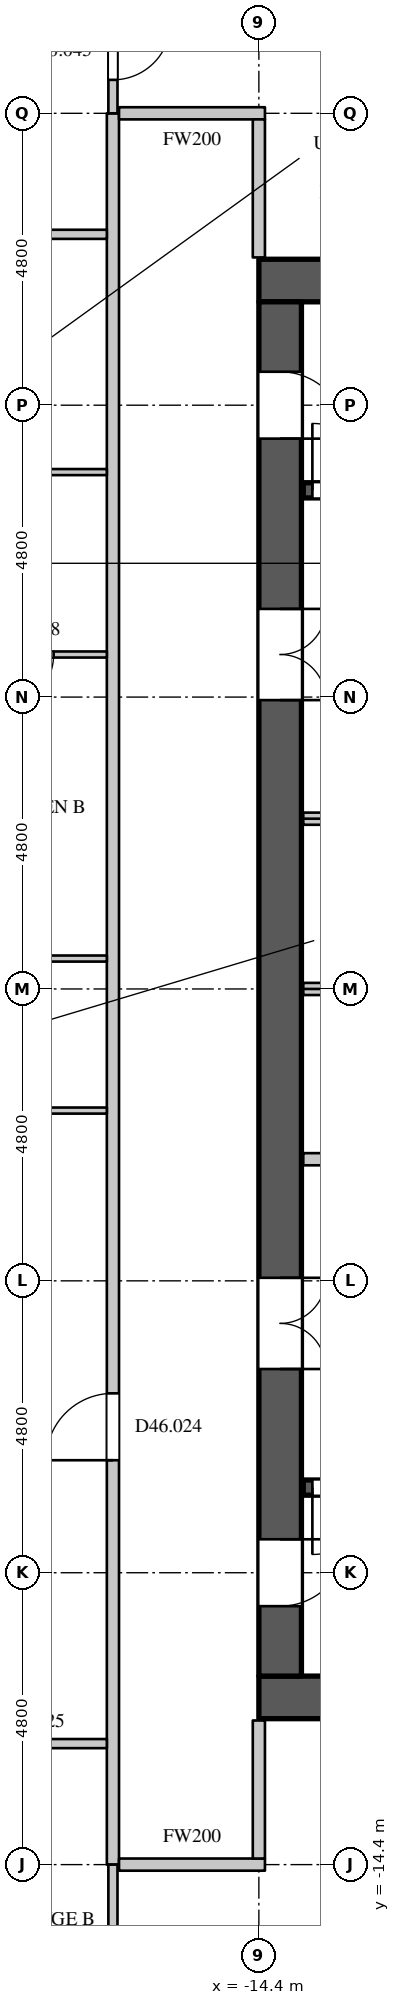
"""IFC4 building model, lengths in metres.
Left out: names, types, materials, properties, quantities, classifications, styles, units other than length and angle.
Written with IfcOpenShell. Run it as: python <this file> out.ifc"""

import sys

from ifc_helpers import new_model, si_unit, direction, frame, frame_2d, origin, place, context, subcontext, project, spatial, rectangle, extrude, element, fill, save


model = new_model("IFC4")
c1 = context("Model", 3, precision=1e-05, world=origin(), true_north=direction((0.0, 1.0)))
c2 = subcontext(c1, "Body", "Model", "MODEL_VIEW")
j1 = project(units=[si_unit("LENGTHUNIT", "METRE"), si_unit("PLANEANGLEUNIT", "RADIAN")], contexts=[c1])
p1 = place(None, origin())
s1 = spatial("IfcSite", under=j1, at=p1, CompositionType="ELEMENT")
p2 = place(p1, origin())
s2 = spatial("IfcBuilding", under=s1, at=p2, CompositionType="ELEMENT")
p3 = place(p2, frame((0.0, 0.0, 200.1)))
s3 = spatial("IfcBuildingStorey", under=s2, at=p3, CompositionType="ELEMENT", Elevation=200.1)
for number, where, z_axis, x_axis in (
    (1, (-14.4, 11.65, 0.0), (0.0, 0.0, 1.0), (1.0, 0.0, 0.0)),
    (2, (-14.4, -11.65, 0.0), (0.0, 0.0, 1.0), (1.0, 0.0, 0.0)),
):
    element("IfcWall", number, at=place(p3, frame(where, z_axis=z_axis, x_axis=x_axis)), inside=s3, PredefinedType="SHEAR", context=c2, shape_type="SweptSolid", body=[
        extrude(rectangle(XDim=28.8, YDim=0.7, at=frame_2d((14.4, 0.0))), origin(), (0.0, 0.0, 1.0), 4.2),
    ])
p4 = place(p3, frame((-14.05, -11.3, 0.0), z_axis=(0.0, 0.0, 1.0), x_axis=(0.0, 1.0, 0.0)))
e3 = element("IfcWall", 3, at=p4, inside=s3, PredefinedType="SHEAR", context=c2, shape_type="SweptSolid", body=[
    extrude(rectangle(XDim=22.6, YDim=0.7, at=frame_2d((11.3, 0.0))), origin(), (0.0, 0.0, 1.0), 4.2),
])
p5 = place(p4, frame((20.35, 0.0, 0.0)))
e4 = element("IfcOpeningElement", 4, at=p5, cuts=e3, PredefinedType="OPENING", context=c2, shape_type="SweptSolid", body=[
    extrude(rectangle(XDim=1.1, YDim=2.2, at=frame_2d((0.55, 1.1))), frame((0.0, 0.36, 0.0), z_axis=(0.0, -1.0, 0.0), x_axis=(1.0, 0.0, 0.0)), (0.0, 0.0, 1.0), 0.72),
])
p6 = place(p4, frame((1.15, 0.0, 0.0)))
e5 = element("IfcOpeningElement", 5, at=p6, cuts=e3, PredefinedType="OPENING", context=c2, shape_type="SweptSolid", body=[
    extrude(rectangle(XDim=1.1, YDim=2.2, at=frame_2d((0.55, 1.1))), frame((0.0, 0.36, 0.0), z_axis=(0.0, -1.0, 0.0), x_axis=(1.0, 0.0, 0.0)), (0.0, 0.0, 1.0), 0.72),
])
p7 = place(p4, frame((16.05, 0.0, 0.0)))
e6 = element("IfcOpeningElement", 6, at=p7, cuts=e3, PredefinedType="OPENING", context=c2, shape_type="SweptSolid", body=[
    extrude(rectangle(XDim=1.5, YDim=2.4, at=frame_2d((0.75, 1.2))), frame((0.0, 0.36, 0.0), z_axis=(0.0, -1.0, 0.0), x_axis=(1.0, 0.0, 0.0)), (0.0, 0.0, 1.0), 0.72),
])
p8 = place(p4, frame((5.05, 0.0, 0.0)))
e7 = element("IfcOpeningElement", 7, at=p8, cuts=e3, PredefinedType="OPENING", context=c2, shape_type="SweptSolid", body=[
    extrude(rectangle(XDim=1.5, YDim=2.4, at=frame_2d((0.75, 1.2))), frame((0.0, 0.36, 0.0), z_axis=(0.0, -1.0, 0.0), x_axis=(1.0, 0.0, 0.0)), (0.0, 0.0, 1.0), 0.72),
])
p9 = place(p3, frame((-16.8, -14.4, 0.0), z_axis=(0.0, 0.0, 1.0), x_axis=(0.0, 1.0, 0.0)))
e8 = element("IfcWall", 8, at=p9, inside=s3, PredefinedType="PARTITIONING", context=c2, shape_type="SweptSolid", body=[
    extrude(rectangle(XDim=28.8, YDim=0.2, at=frame_2d((14.4, 0.0))), origin(), (0.0, 0.0, 1.0), 3.798),
])
p10 = place(p9, frame((6.65, 0.0, 0.0)))
e9 = element("IfcOpeningElement", 9, at=p10, cuts=e8, PredefinedType="OPENING", context=c2, shape_type="SweptSolid", body=[
    extrude(rectangle(XDim=1.1, YDim=2.4, at=frame_2d((0.55, 1.2))), frame((0.0, 0.11, 0.0), z_axis=(0.0, -1.0, 0.0), x_axis=(1.0, 0.0, 0.0)), (0.0, 0.0, 1.0), 0.22),
])
for number, where, z_axis, x_axis in (
    (10, (-16.7, -14.4, 0.0), (0.0, 0.0, 1.0), (1.0, 0.0, 0.0)),
    (11, (-16.7, 14.4, 0.0), (0.0, 0.0, 1.0), (1.0, 0.0, 0.0)),
):
    element("IfcWall", number, at=place(p3, frame(where, z_axis=z_axis, x_axis=x_axis)), inside=s3, PredefinedType="PARTITIONING", context=c2, shape_type="SweptSolid", body=[
        extrude(rectangle(XDim=2.4, YDim=0.2, at=frame_2d((1.2, 0.0))), origin(), (0.0, 0.0, 1.0), 3.798),
    ])
for number, where, z_axis, x_axis in (
    (12, (-14.4, -14.3, 0.0), (0.0, 0.0, 1.0), (0.0, 1.0, 0.0)),
    (13, (-14.4, 12.03, 0.0), (0.0, 0.0, 1.0), (0.0, 1.0, 0.0)),
):
    element("IfcWall", number, at=place(p3, frame(where, z_axis=z_axis, x_axis=x_axis)), inside=s3, PredefinedType="PARTITIONING", context=c2, shape_type="SweptSolid", body=[
        extrude(rectangle(XDim=2.27, YDim=0.2, at=frame_2d((1.135, 0.0))), origin(), (0.0, 0.0, 1.0), 3.798),
    ])
p11 = place(p3, frame((-22.529, -12.41, 0.0), z_axis=(0.0, 0.0, 1.0), x_axis=(1.0, 0.0, 0.0)))
e14 = element("IfcWall", 14, at=p11, inside=s3, PredefinedType="PARTITIONING", context=c2, shape_type="SweptSolid", body=[
    extrude(rectangle(XDim=5.629, YDim=0.15, at=frame_2d((2.815, 0.0))), origin(), (0.0, 0.0, 1.0), 3.798),
])
p12 = place(p11, frame((3.56, 0.0, 0.0)))
e15 = element("IfcOpeningElement", 15, at=p12, cuts=e14, PredefinedType="OPENING", context=c2, shape_type="SweptSolid", body=[
    extrude(rectangle(XDim=0.95, YDim=2.2, at=frame_2d((0.475, 1.1))), frame((0.0, 0.085, 0.0), z_axis=(0.0, -1.0, 0.0), x_axis=(1.0, 0.0, 0.0)), (0.0, 0.0, 1.0), 0.17),
])
p13 = place(p3, frame((-22.529, 12.41, 0.0), z_axis=(0.0, 0.0, 1.0), x_axis=(1.0, 0.0, 0.0)))
e16 = element("IfcWall", 16, at=p13, inside=s3, PredefinedType="PARTITIONING", context=c2, shape_type="SweptSolid", body=[
    extrude(rectangle(XDim=5.629, YDim=0.15, at=frame_2d((2.815, 0.0))), origin(), (0.0, 0.0, 1.0), 3.798),
])
p14 = place(p13, frame((0.76, 0.0, 0.0)))
e17 = element("IfcOpeningElement", 17, at=p14, cuts=e16, PredefinedType="OPENING", context=c2, shape_type="SweptSolid", body=[
    extrude(rectangle(XDim=0.95, YDim=2.2, at=frame_2d((0.475, 1.1))), frame((0.0, 0.085, 0.0), z_axis=(0.0, -1.0, 0.0), x_axis=(1.0, 0.0, 0.0)), (0.0, 0.0, 1.0), 0.17),
])
p15 = place(p3, frame((-16.8, -18.131, 0.0), z_axis=(0.0, 0.0, 1.0), x_axis=(0.0, 1.0, 0.0)))
e18 = element("IfcWall", 18, at=p15, inside=s3, PredefinedType="PARTITIONING", context=c2, shape_type="SweptSolid", body=[
    extrude(rectangle(XDim=3.731, YDim=0.15, at=frame_2d((1.865, 0.0))), origin(), (0.0, 0.0, 1.0), 3.798),
])
p16 = place(p15, frame((0.85, 0.0, 0.0)))
e19 = element("IfcOpeningElement", 19, at=p16, cuts=e18, PredefinedType="OPENING", context=c2, shape_type="SweptSolid", body=[
    extrude(rectangle(XDim=0.95, YDim=2.2, at=frame_2d((0.475, 1.1))), frame((0.0, 0.085, 0.0), z_axis=(0.0, -1.0, 0.0), x_axis=(1.0, 0.0, 0.0)), (0.0, 0.0, 1.0), 0.17),
])
p17 = place(p3, frame((-16.8, 14.4, 0.0), z_axis=(0.0, 0.0, 1.0), x_axis=(0.0, 1.0, 0.0)))
e20 = element("IfcWall", 20, at=p17, inside=s3, PredefinedType="PARTITIONING", context=c2, shape_type="SweptSolid", body=[
    extrude(rectangle(XDim=3.731, YDim=0.15, at=frame_2d((1.865, 0.0))), origin(), (0.0, 0.0, 1.0), 3.798),
])
p18 = place(p17, frame((0.55, 0.0, 0.0)))
e21 = element("IfcOpeningElement", 21, at=p18, cuts=e20, PredefinedType="OPENING", context=c2, shape_type="SweptSolid", body=[
    extrude(rectangle(XDim=0.95, YDim=2.2, at=frame_2d((0.475, 1.1))), frame((0.0, 0.085, 0.0), z_axis=(0.0, -1.0, 0.0), x_axis=(1.0, 0.0, 0.0)), (0.0, 0.0, 1.0), 0.17),
])
p19 = place(p3, frame((-13.67, -2.8, 0.0), z_axis=(0.0, 0.0, 1.0), x_axis=(1.0, 0.0, 0.0)))
e22 = element("IfcWall", 22, at=p19, inside=s3, PredefinedType="PARTITIONING", context=c2, shape_type="SweptSolid", body=[
    extrude(rectangle(XDim=3.27, YDim=0.2, at=frame_2d((1.635, 0.0))), origin(), (0.0, 0.0, 1.0), 3.798),
])
p20 = place(p19, frame((1.3, 0.0, 0.0)))
e23 = element("IfcOpeningElement", 23, at=p20, cuts=e22, PredefinedType="OPENING", context=c2, shape_type="SweptSolid", body=[
    extrude(rectangle(XDim=0.6, YDim=2.0, at=frame_2d((0.3, 1.0))), frame((0.0, 0.11, 0.0), z_axis=(0.0, -1.0, 0.0), x_axis=(1.0, 0.0, 0.0)), (0.0, 0.0, 1.0), 0.22),
])
p21 = place(p3, frame((-13.67, 0.0, 0.0), z_axis=(0.0, 0.0, 1.0), x_axis=(1.0, 0.0, 0.0)))
e24 = element("IfcWall", 24, at=p21, inside=s3, PredefinedType="PARTITIONING", context=c2, shape_type="SweptSolid", body=[
    extrude(rectangle(XDim=21.47, YDim=0.2, at=frame_2d((10.735, 0.0))), origin(), (0.0, 0.0, 1.0), 3.798),
])
p22 = place(p3, frame((-13.67, 2.8, 0.0), z_axis=(0.0, 0.0, 1.0), x_axis=(1.0, 0.0, 0.0)))
e25 = element("IfcWall", 25, at=p22, inside=s3, PredefinedType="PARTITIONING", context=c2, shape_type="SweptSolid", body=[
    extrude(rectangle(XDim=5.85, YDim=0.2, at=frame_2d((2.925, 0.0))), origin(), (0.0, 0.0, 1.0), 3.798),
])
p23 = place(p22, frame((1.05, 0.0, 0.0)))
e26 = element("IfcOpeningElement", 26, at=p23, cuts=e25, PredefinedType="OPENING", context=c2, shape_type="SweptSolid", body=[
    extrude(rectangle(XDim=1.1, YDim=2.2, at=frame_2d((0.55, 1.1))), frame((0.0, 0.11, 0.0), z_axis=(0.0, -1.0, 0.0), x_axis=(1.0, 0.0, 0.0)), (0.0, 0.0, 1.0), 0.22),
])
p24 = place(p22, frame((4.0, 0.0, 0.0)))
e27 = element("IfcOpeningElement", 27, at=p24, cuts=e25, PredefinedType="OPENING", context=c2, shape_type="SweptSolid", body=[
    extrude(rectangle(XDim=1.1, YDim=2.2, at=frame_2d((0.55, 1.1))), frame((0.0, 0.11, 0.0), z_axis=(0.0, -1.0, 0.0), x_axis=(1.0, 0.0, 0.0)), (0.0, 0.0, 1.0), 0.22),
])
p25 = place(p3, frame((-13.67, -8.2, 0.0), z_axis=(0.0, 0.0, 1.0), x_axis=(1.0, 0.0, 0.0)))
e28 = element("IfcWall", 28, at=p25, inside=s3, PredefinedType="SHEAR", context=c2, shape_type="SweptSolid", body=[
    extrude(rectangle(XDim=8.395, YDim=0.25, at=frame_2d((4.198, 0.0))), origin(), (0.0, 0.0, 1.0), 3.798),
])
p26 = place(p25, frame((0.15, 0.0, 0.0)))
e29 = element("IfcOpeningElement", 29, at=p26, cuts=e28, PredefinedType="OPENING", context=c2, shape_type="SweptSolid", body=[
    extrude(rectangle(XDim=1.1, YDim=2.2, at=frame_2d((0.55, 1.1))), frame((0.0, 0.135, 0.0), z_axis=(0.0, -1.0, 0.0), x_axis=(1.0, 0.0, 0.0)), (0.0, 0.0, 1.0), 0.27),
])
p27 = place(p3, frame((-13.67, 8.2, 0.0), z_axis=(0.0, 0.0, 1.0), x_axis=(1.0, 0.0, 0.0)))
e30 = element("IfcWall", 30, at=p27, inside=s3, PredefinedType="SHEAR", context=c2, shape_type="SweptSolid", body=[
    extrude(rectangle(XDim=8.395, YDim=0.25, at=frame_2d((4.198, 0.0))), origin(), (0.0, 0.0, 1.0), 3.798),
])
p28 = place(p27, frame((0.15, 0.0, 0.0)))
e31 = element("IfcOpeningElement", 31, at=p28, cuts=e30, PredefinedType="OPENING", context=c2, shape_type="SweptSolid", body=[
    extrude(rectangle(XDim=1.1, YDim=2.2, at=frame_2d((0.55, 1.1))), frame((0.0, 0.135, 0.0), z_axis=(0.0, -1.0, 0.0), x_axis=(1.0, 0.0, 0.0)), (0.0, 0.0, 1.0), 0.27),
])
p29 = place(p3, frame((-20.45, -2.0, 0.0), z_axis=(0.0, 0.0, 1.0), x_axis=(1.0, 0.0, 0.0)))
e32 = element("IfcWall", 32, at=p29, inside=s3, PredefinedType="PARTITIONING", context=c2, shape_type="SweptSolid", body=[
    extrude(rectangle(XDim=3.55, YDim=0.1, at=frame_2d((1.775, 0.0))), origin(), (0.0, 0.0, 1.0), 3.798),
])
p30 = place(p29, frame((1.3, 0.0, 0.0)))
e33 = element("IfcOpeningElement", 33, at=p30, cuts=e32, PredefinedType="OPENING", context=c2, shape_type="SweptSolid", body=[
    extrude(rectangle(XDim=0.9, YDim=2.2, at=frame_2d((0.45, 1.1))), frame((0.0, 0.06, 0.0), z_axis=(0.0, -1.0, 0.0), x_axis=(1.0, 0.0, 0.0)), (0.0, 0.0, 1.0), 0.12),
])
p31 = place(p3, frame((-20.425, 0.5, 0.0), z_axis=(0.0, 0.0, 1.0), x_axis=(1.0, 0.0, 0.0)))
e34 = element("IfcWall", 34, at=p31, inside=s3, PredefinedType="PARTITIONING", context=c2, shape_type="SweptSolid", body=[
    extrude(rectangle(XDim=3.525, YDim=0.1, at=frame_2d((1.763, 0.0))), origin(), (0.0, 0.0, 1.0), 3.798),
])
p32 = place(p3, frame((-19.475, 5.5, 0.0), z_axis=(0.0, 0.0, 1.0), x_axis=(1.0, 0.0, 0.0)))
e35 = element("IfcWall", 35, at=p32, inside=s3, PredefinedType="PARTITIONING", context=c2, shape_type="SweptSolid", body=[
    extrude(rectangle(XDim=2.575, YDim=0.1, at=frame_2d((1.288, 0.0))), origin(), (0.0, 0.0, 1.0), 3.798),
])
p33 = place(p32, frame((0.8, 0.0, 0.0)))
e36 = element("IfcOpeningElement", 36, at=p33, cuts=e35, PredefinedType="OPENING", context=c2, shape_type="SweptSolid", body=[
    extrude(rectangle(XDim=0.9, YDim=2.2, at=frame_2d((0.45, 1.1))), frame((0.0, 0.06, 0.0), z_axis=(0.0, -1.0, 0.0), x_axis=(1.0, 0.0, 0.0)), (0.0, 0.0, 1.0), 0.12),
])
p34 = place(p3, frame((-19.475, 8.5, 0.0), z_axis=(0.0, 0.0, 1.0), x_axis=(1.0, 0.0, 0.0)))
e37 = element("IfcWall", 37, at=p34, inside=s3, PredefinedType="PARTITIONING", context=c2, shape_type="SweptSolid", body=[
    extrude(rectangle(XDim=2.575, YDim=0.1, at=frame_2d((1.288, 0.0))), origin(), (0.0, 0.0, 1.0), 3.798),
])
p35 = place(p28, origin())
e38 = element("IfcDoor", 38, at=p35, inside=s3, OperationType="SINGLE_SWING_LEFT", PredefinedType="DOOR", context=c2, shape_type="SweptSolid", body=[
    extrude(rectangle(XDim=1.1, YDim=2.2, at=frame_2d((0.55, 1.1))), frame((0.0, 0.025, 0.0), z_axis=(0.0, -1.0, 0.0), x_axis=(1.0, 0.0, 0.0)), (0.0, 0.0, 1.0), 0.05),
])
fill(e31, e38)
p36 = place(p26, origin())
e39 = element("IfcDoor", 39, at=p36, inside=s3, OperationType="SINGLE_SWING_RIGHT", PredefinedType="DOOR", context=c2, shape_type="SweptSolid", body=[
    extrude(rectangle(XDim=1.1, YDim=2.2, at=frame_2d((0.55, 1.1))), frame((0.0, 0.025, 0.0), z_axis=(0.0, -1.0, 0.0), x_axis=(1.0, 0.0, 0.0)), (0.0, 0.0, 1.0), 0.05),
])
fill(e29, e39)
p37 = place(p5, origin())
e40 = element("IfcDoor", 40, at=p37, inside=s3, OperationType="SINGLE_SWING_RIGHT", PredefinedType="DOOR", context=c2, shape_type="SweptSolid", body=[
    extrude(rectangle(XDim=1.1, YDim=2.2, at=frame_2d((0.55, 1.1))), frame((0.0, -0.295, 0.0), z_axis=(0.0, -1.0, 0.0), x_axis=(1.0, 0.0, 0.0)), (0.0, 0.0, 1.0), 0.05),
])
fill(e4, e40)
p38 = place(p6, origin())
e41 = element("IfcDoor", 41, at=p38, inside=s3, OperationType="SINGLE_SWING_LEFT", PredefinedType="DOOR", context=c2, shape_type="SweptSolid", body=[
    extrude(rectangle(XDim=1.1, YDim=2.2, at=frame_2d((0.55, 1.1))), frame((0.0, -0.295, 0.0), z_axis=(0.0, -1.0, 0.0), x_axis=(1.0, 0.0, 0.0)), (0.0, 0.0, 1.0), 0.05),
])
fill(e5, e41)
p39 = place(p7, origin())
e42 = element("IfcDoor", 42, at=p39, inside=s3, OperationType="DOUBLE_DOOR_SINGLE_SWING", PredefinedType="DOOR", context=c2, shape_type="SweptSolid", body=[
    extrude(rectangle(XDim=1.5, YDim=2.4, at=frame_2d((0.75, 1.2))), frame((0.0, -0.295, 0.0), z_axis=(0.0, -1.0, 0.0), x_axis=(1.0, 0.0, 0.0)), (0.0, 0.0, 1.0), 0.05),
])
fill(e6, e42)
p40 = place(p8, origin())
e43 = element("IfcDoor", 43, at=p40, inside=s3, OperationType="DOUBLE_DOOR_SINGLE_SWING", PredefinedType="DOOR", context=c2, shape_type="SweptSolid", body=[
    extrude(rectangle(XDim=1.5, YDim=2.4, at=frame_2d((0.75, 1.2))), frame((0.0, -0.295, 0.0), z_axis=(0.0, -1.0, 0.0), x_axis=(1.0, 0.0, 0.0)), (0.0, 0.0, 1.0), 0.05),
])
fill(e7, e43)
p41 = place(p10, origin())
e44 = element("IfcDoor", 44, at=p41, inside=s3, OperationType="SINGLE_SWING_LEFT", PredefinedType="DOOR", context=c2, shape_type="SweptSolid", body=[
    extrude(rectangle(XDim=1.1, YDim=2.4, at=frame_2d((0.55, 1.2))), frame((0.0, 0.025, 0.0), z_axis=(0.0, -1.0, 0.0), x_axis=(1.0, 0.0, 0.0)), (0.0, 0.0, 1.0), 0.05),
])
fill(e9, e44)
p42 = place(p18, origin())
e45 = element("IfcDoor", 45, at=p42, inside=s3, OperationType="SINGLE_SWING_LEFT", PredefinedType="DOOR", context=c2, shape_type="SweptSolid", body=[
    extrude(rectangle(XDim=0.95, YDim=2.2, at=frame_2d((0.475, 1.1))), frame((0.0, 0.025, 0.0), z_axis=(0.0, -1.0, 0.0), x_axis=(1.0, 0.0, 0.0)), (0.0, 0.0, 1.0), 0.05),
])
fill(e21, e45)
p43 = place(p33, origin())
e46 = element("IfcDoor", 46, at=p43, inside=s3, OperationType="SINGLE_SWING_RIGHT", PredefinedType="DOOR", context=c2, shape_type="SweptSolid", body=[
    extrude(rectangle(XDim=0.9, YDim=2.2, at=frame_2d((0.45, 1.1))), frame((0.0, 0.025, 0.0), z_axis=(0.0, -1.0, 0.0), x_axis=(1.0, 0.0, 0.0)), (0.0, 0.0, 1.0), 0.05),
])
fill(e36, e46)
save(model, sys.argv[1])
